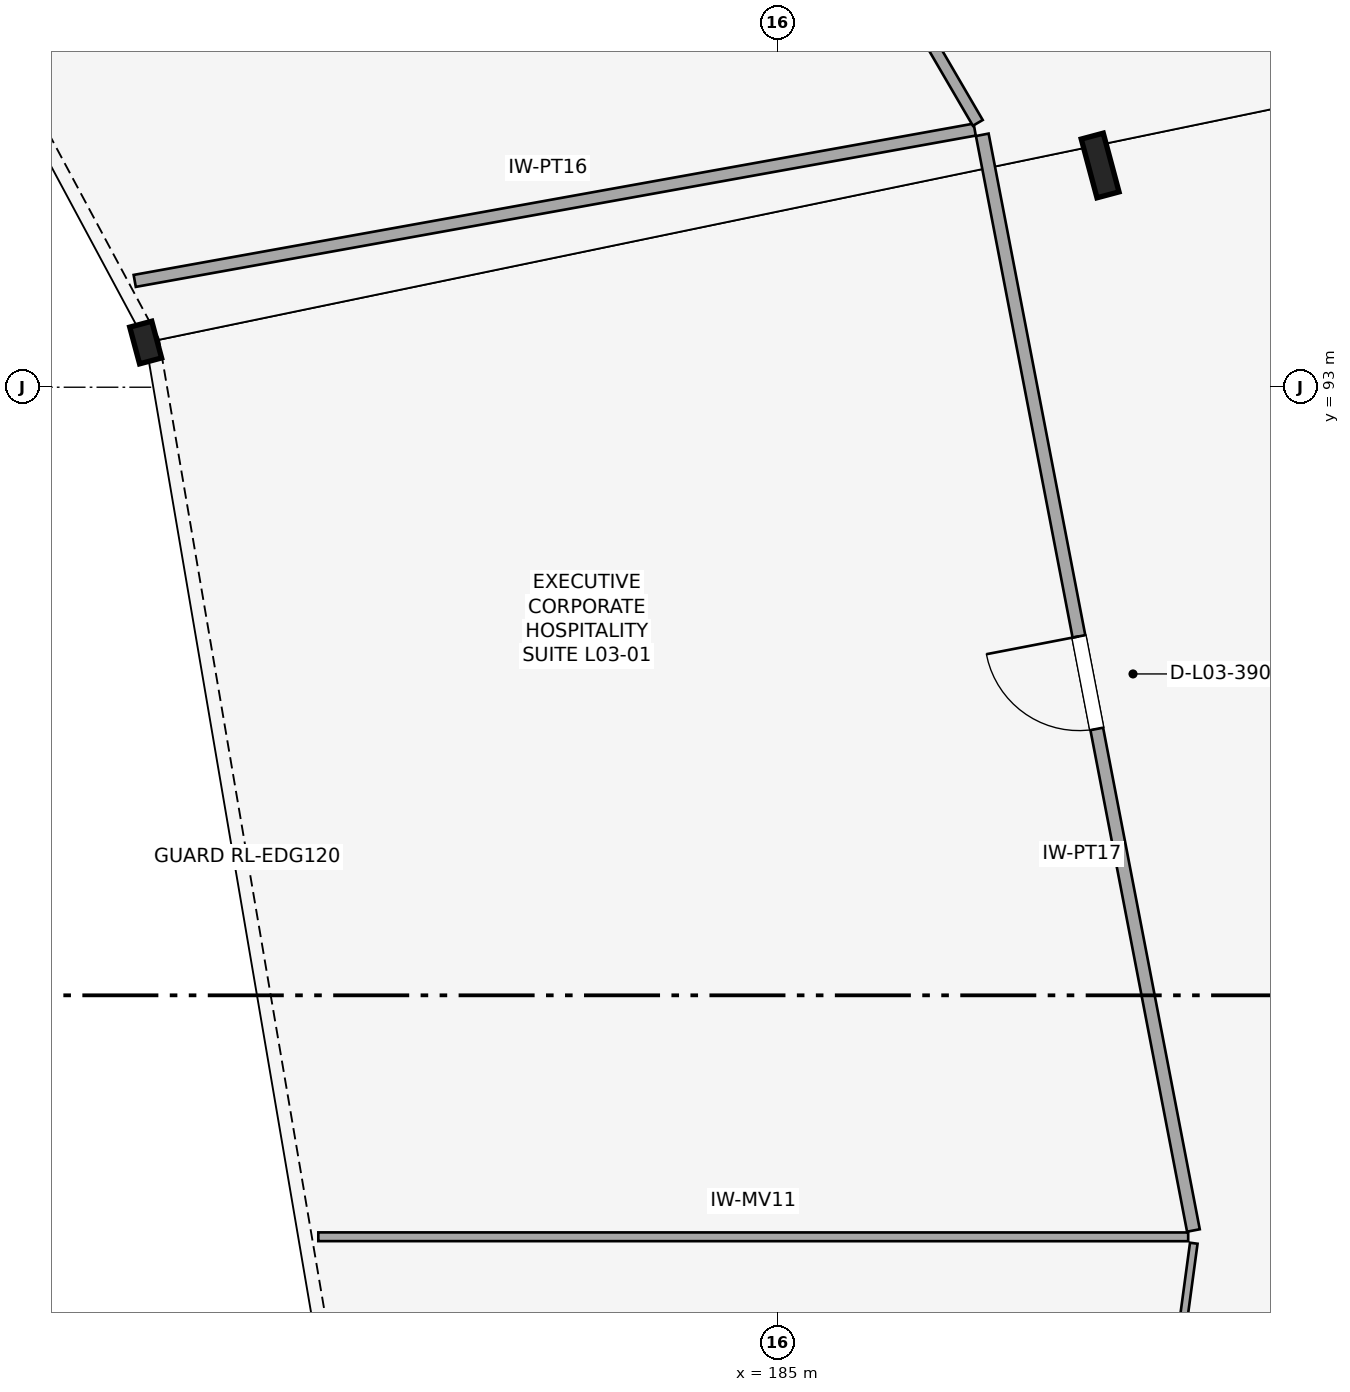
"""IFC4 building model, lengths in metres.
Left out: names, types, materials, properties, quantities, classifications, styles, units other than length and angle.
Written with IfcOpenShell. Run it as: python <this file> out.ifc"""

import sys

from ifc_helpers import new_model, si_unit, direction, frame, frame_2d, origin, origin_2d, place, context, subcontext, project, spatial, rectangle, i_section, extrude, element, fill, save


model = new_model("IFC4")
c1 = context("Model", 3, precision=1e-05, world=origin(), true_north=direction((0.0, 1.0)))
c2 = subcontext(c1, "Body", "Model", "MODEL_VIEW")
j1 = project(units=[si_unit("LENGTHUNIT", "METRE"), si_unit("PLANEANGLEUNIT", "RADIAN")], contexts=[c1])
p1 = place(None, origin())
s1 = spatial("IfcSite", under=j1, at=p1, CompositionType="ELEMENT")
p2 = place(p1, origin())
s2 = spatial("IfcBuilding", under=s1, at=p2, CompositionType="ELEMENT")
p3 = place(p2, frame((0.0, 0.0, 15.6)))
s3 = spatial("IfcBuildingStorey", under=s2, at=p3, CompositionType="ELEMENT", Elevation=15.6)
p4 = place(p3, frame((176.683, 93.588, 0.0), z_axis=(0.0, 0.0, 1.0), x_axis=(0.965925826289, 0.258819045103, 0.0)))
e1 = element("IfcColumn", 1, at=p4, inside=s3, PredefinedType="COLUMN", context=c2, shape_type="SweptSolid", body=[
    extrude(i_section(OverallWidth=0.3, OverallDepth=0.5, WebThickness=0.014, FlangeThickness=0.028, FilletRadius=0.027, at=origin_2d()), origin(), (0.0, 0.0, 1.0), 3.48),
])
p5 = place(p3, frame((189.24, 95.917, 0.0), z_axis=(0.0, 0.0, 1.0), x_axis=(0.965925826289, 0.258819045103, 0.0)))
e2 = element("IfcColumn", 2, at=p5, inside=s3, PredefinedType="COLUMN", context=c2, shape_type="SweptSolid", body=[
    extrude(i_section(OverallWidth=0.3, OverallDepth=0.8, WebThickness=0.018, FlangeThickness=0.033, FilletRadius=0.03, at=origin_2d()), origin(), (0.0, 0.0, 1.0), 5.2),
])
p6 = place(p3, frame((190.467, 81.906, 0.0), z_axis=(0.0, 0.0, 1.0), x_axis=(-0.189225499552, 0.981933658818, 0.0)))
e3 = element("IfcWall", 3, at=p6, inside=s3, PredefinedType="PARTITIONING", context=c2, shape_type="SweptSolid", body=[
    extrude(rectangle(XDim=14.68, YDim=0.17, at=frame_2d((7.34, 0.0))), origin(), (0.0, 0.0, 1.0), 2.45),
])
p7 = place(p6, frame((6.72, 0.0, 0.0)))
e4 = element("IfcOpeningElement", 4, at=p7, cuts=e3, PredefinedType="OPENING", context=c2, shape_type="SweptSolid", body=[
    extrude(rectangle(XDim=1.24, YDim=2.1, at=frame_2d((0.62, 1.05))), frame((0.0, 0.095, 0.0), z_axis=(0.0, -1.0, 0.0), x_axis=(1.0, 0.0, 0.0)), (0.0, 0.0, 1.0), 0.19),
])
p8 = place(p3, frame((176.539, 94.399, 0.0), z_axis=(0.0, 0.0, 1.0), x_axis=(0.984158749796, 0.177289467255, 0.0)))
e5 = element("IfcWall", 5, at=p8, inside=s3, PredefinedType="PARTITIONING", context=c2, shape_type="SweptSolid", body=[
    extrude(rectangle(XDim=11.229, YDim=0.16, at=frame_2d((5.614, 0.0))), origin(), (0.0, 0.0, 1.0), 2.45),
])
p9 = place(p3, frame((187.631, 96.478, 0.0), z_axis=(0.0, 0.0, 1.0), x_axis=(-0.50388511134, 0.863770684019, 0.0)))
e6 = element("IfcWall", 6, at=p9, inside=s3, PredefinedType="PARTITIONING", context=c2, shape_type="SweptSolid", body=[
    extrude(rectangle(XDim=17.242, YDim=0.15, at=frame_2d((8.621, 0.0))), origin(), (0.0, 0.0, 1.0), 2.45),
])
p10 = place(p9, frame((8.171, 0.0, 0.0)))
e7 = element("IfcOpeningElement", 7, at=p10, cuts=e6, PredefinedType="OPENING", context=c2, shape_type="SweptSolid", body=[
    extrude(rectangle(XDim=0.9, YDim=2.24, at=frame_2d((0.45, 1.12))), frame((0.0, 0.085, 0.0), z_axis=(0.0, -1.0, 0.0), x_axis=(1.0, 0.0, 0.0)), (0.0, 0.0, 1.0), 0.17),
])
p11 = place(p3, frame((188.289, 65.559, 0.0), z_axis=(0.0, 0.0, 1.0), x_axis=(0.133715075634, 0.991019817435, 0.0)))
e8 = element("IfcWall", 8, at=p11, inside=s3, PredefinedType="PARTITIONING", context=c2, shape_type="SweptSolid", body=[
    extrude(rectangle(XDim=16.327, YDim=0.1, at=frame_2d((8.163, 0.0))), origin(), (0.0, 0.0, 1.0), 2.45),
])
p12 = place(p3, frame((178.954, 81.824, 0.0), z_axis=(0.0, 0.0, 1.0), x_axis=(0.999999996359, -8.5333333e-05, 0.0)))
e9 = element("IfcWall", 9, at=p12, inside=s3, PredefinedType="MOVABLE", context=c2, shape_type="SweptSolid", body=[
    extrude(rectangle(XDim=11.444, YDim=0.115, at=frame_2d((5.722, 0.0))), origin(), (0.0, 0.0, 1.0), 2.45),
])
p13 = place(p7, origin())
e10 = element("IfcDoor", 10, at=p13, inside=s3, OperationType="SINGLE_SWING_RIGHT", PredefinedType="DOOR", context=c2, shape_type="SweptSolid", body=[
    extrude(rectangle(XDim=1.24, YDim=2.1, at=frame_2d((0.62, 1.05))), frame((0.0, 0.025, 0.0), z_axis=(0.0, -1.0, 0.0), x_axis=(1.0, 0.0, 0.0)), (0.0, 0.0, 1.0), 0.05),
])
fill(e4, e10)
save(model, sys.argv[1])
